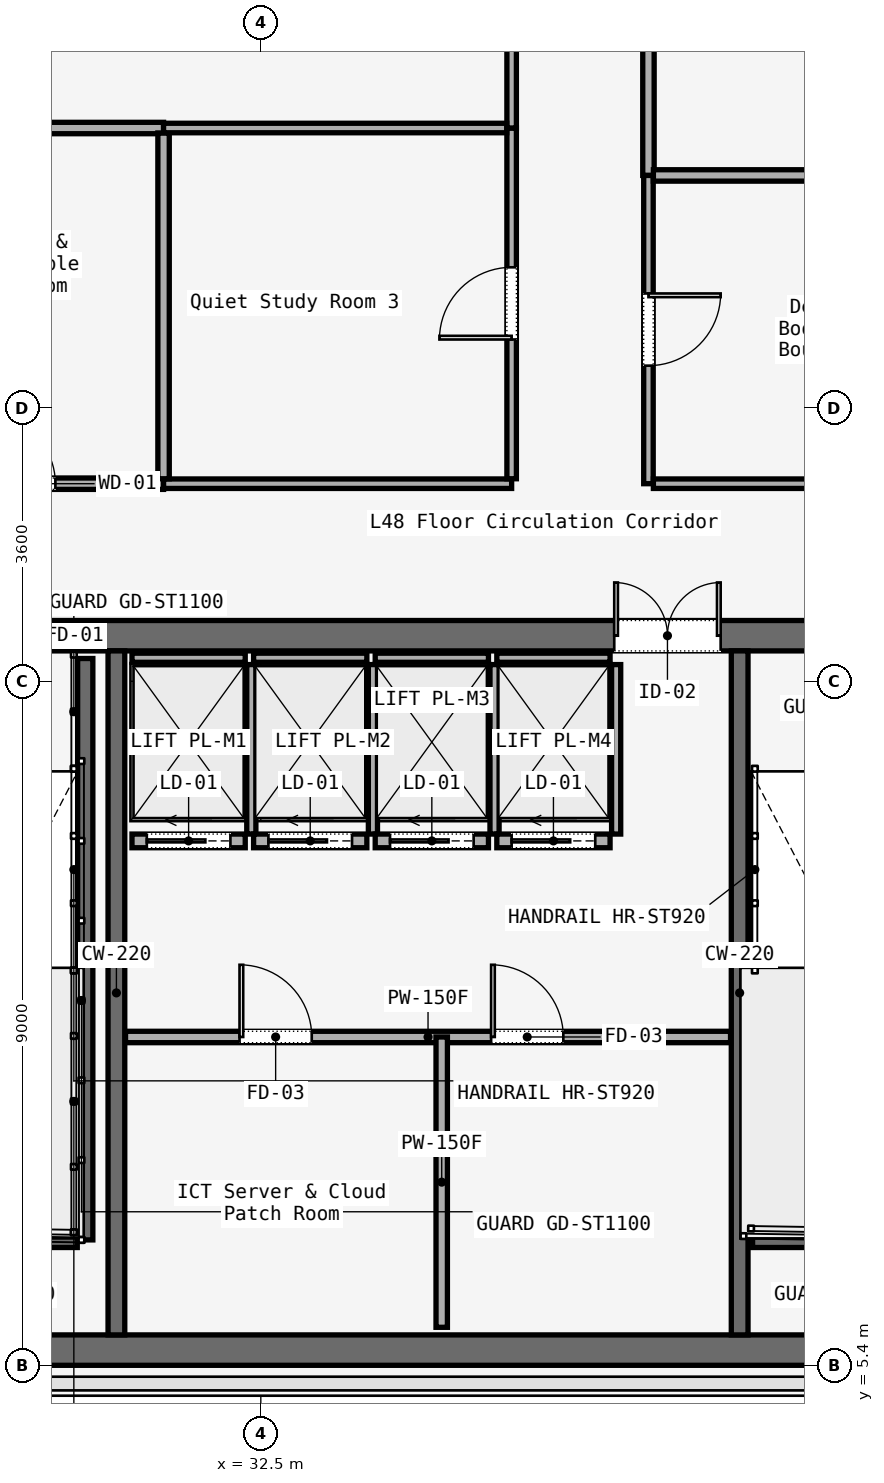
"""IFC4 building model, lengths in metres.
Left out: names, types, materials, properties, quantities, classifications, styles, units other than length and angle.
Written with IfcOpenShell. Run it as: python <this file> out.ifc"""

import sys

from ifc_helpers import new_model, si_unit, direction, frame, frame_2d, origin, place, context, subcontext, project, spatial, rectangle, extrude, element, fill, save


model = new_model("IFC4")
c1 = context("Model", 3, precision=1e-05, world=origin(), true_north=direction((0.0, 1.0)))
c2 = subcontext(c1, "Body", "Model", "MODEL_VIEW")
j1 = project(units=[si_unit("LENGTHUNIT", "METRE"), si_unit("PLANEANGLEUNIT", "RADIAN")], contexts=[c1])
p1 = place(None, origin())
s1 = spatial("IfcSite", under=j1, at=p1, CompositionType="ELEMENT")
p2 = place(p1, origin())
s2 = spatial("IfcBuilding", under=s1, at=p2, CompositionType="ELEMENT")
p3 = place(p2, frame((0.0, 0.0, 199.2)))
s3 = spatial("IfcBuildingStorey", under=s2, at=p3, CompositionType="ELEMENT", Elevation=199.2)
p4 = place(p3, frame((26.45, 15.0, 0.0), z_axis=(0.0, 0.0, 1.0), x_axis=(1.0, 0.0, 0.0)))
e1 = element("IfcWall", 1, at=p4, inside=s3, PredefinedType="SOLIDWALL", context=c2, shape_type="SweptSolid", body=[
    extrude(rectangle(XDim=31.1, YDim=0.4, at=frame_2d((15.55, 0.0))), origin(), (0.0, 0.0, 1.0), 3.52),
])
p5 = place(p4, frame((1.65, 0.0, 0.0)))
e2 = element("IfcOpeningElement", 2, at=p5, cuts=e1, PredefinedType="OPENING", context=c2, shape_type="SweptSolid", body=[
    extrude(rectangle(XDim=1.1, YDim=2.2, at=frame_2d((0.55, 1.1))), frame((0.0, 0.2, 0.0), z_axis=(0.0, -1.0, 0.0), x_axis=(1.0, 0.0, 0.0)), (0.0, 0.0, 1.0), 0.4),
])
p6 = place(p4, frame((13.65, 0.0, 0.0)))
e3 = element("IfcOpeningElement", 3, at=p6, cuts=e1, PredefinedType="OPENING", context=c2, shape_type="SweptSolid", body=[
    extrude(rectangle(XDim=1.1, YDim=2.2, at=frame_2d((0.55, 1.1))), frame((0.0, 0.2, 0.0), z_axis=(0.0, -1.0, 0.0), x_axis=(1.0, 0.0, 0.0)), (0.0, 0.0, 1.0), 0.4),
])
p7 = place(p4, frame((25.55, 0.0, 0.0)))
e4 = element("IfcOpeningElement", 4, at=p7, cuts=e1, PredefinedType="OPENING", context=c2, shape_type="SweptSolid", body=[
    extrude(rectangle(XDim=1.1, YDim=2.2, at=frame_2d((0.55, 1.1))), frame((0.0, 0.2, 0.0), z_axis=(0.0, -1.0, 0.0), x_axis=(1.0, 0.0, 0.0)), (0.0, 0.0, 1.0), 0.4),
])
p8 = place(p4, frame((10.7, 0.0, 0.0)))
e5 = element("IfcOpeningElement", 5, at=p8, cuts=e1, PredefinedType="OPENING", context=c2, shape_type="SweptSolid", body=[
    extrude(rectangle(XDim=1.4, YDim=2.2, at=frame_2d((0.7, 1.1))), frame((0.0, 0.2, 0.0), z_axis=(0.0, -1.0, 0.0), x_axis=(1.0, 0.0, 0.0)), (0.0, 0.0, 1.0), 0.4),
])
p9 = place(p4, frame((19.35, 0.0, 0.0)))
e6 = element("IfcOpeningElement", 6, at=p9, cuts=e1, PredefinedType="OPENING", context=c2, shape_type="SweptSolid", body=[
    extrude(rectangle(XDim=1.1, YDim=2.2, at=frame_2d((0.55, 1.1))), frame((0.0, 0.2, 0.0), z_axis=(0.0, -1.0, 0.0), x_axis=(1.0, 0.0, 0.0)), (0.0, 0.0, 1.0), 0.4),
])
p10 = place(p4, frame((21.4, 0.0, 0.0)))
e7 = element("IfcOpeningElement", 7, at=p10, cuts=e1, PredefinedType="OPENING", context=c2, shape_type="SweptSolid", body=[
    extrude(rectangle(XDim=0.9, YDim=2.1, at=frame_2d((0.45, 1.05))), frame((0.0, 0.2, 0.0), z_axis=(0.0, -1.0, 0.0), x_axis=(1.0, 0.0, 0.0)), (0.0, 0.0, 1.0), 0.4),
])
p11 = place(p4, frame((23.35, 0.0, 0.0)))
e8 = element("IfcOpeningElement", 8, at=p11, cuts=e1, PredefinedType="OPENING", context=c2, shape_type="SweptSolid", body=[
    extrude(rectangle(XDim=1.3, YDim=2.3, at=frame_2d((0.65, 1.15))), frame((0.0, 0.2, 0.0), z_axis=(0.0, -1.0, 0.0), x_axis=(1.0, 0.0, 0.0)), (0.0, 0.0, 1.0), 0.4),
])
p12 = place(p3, frame((26.45, 5.6, 0.0), z_axis=(0.0, 0.0, 1.0), x_axis=(1.0, 0.0, 0.0)))
e9 = element("IfcWall", 9, at=p12, inside=s3, PredefinedType="SOLIDWALL", context=c2, shape_type="SweptSolid", body=[
    extrude(rectangle(XDim=31.1, YDim=0.4, at=frame_2d((15.55, 0.0))), origin(), (0.0, 0.0, 1.0), 3.52),
])
for number, where, z_axis, x_axis in (
    (10, (30.6, 5.8, 0.0), (0.0, 0.0, 1.0), (0.0, 1.0, 0.0)),
    (11, (38.8, 5.8, 0.0), (0.0, 0.0, 1.0), (0.0, 1.0, 0.0)),
):
    element("IfcWall", number, at=place(p3, frame(where, z_axis=z_axis, x_axis=x_axis)), inside=s3, PredefinedType="SOLIDWALL", context=c2, shape_type="SweptSolid", body=[
        extrude(rectangle(XDim=9.0, YDim=0.22, at=frame_2d((4.5, 0.0))), origin(), (0.0, 0.0, 1.0), 3.52),
    ])
p13 = place(p3, frame((30.19, 14.7, 0.0), z_axis=(0.0, 0.0, 1.0), x_axis=(0.0, -1.0, 0.0)))
e12 = element("IfcWall", 12, at=p13, inside=s3, PredefinedType="SOLIDWALL", context=c2, shape_type="SweptSolid", body=[
    extrude(rectangle(XDim=7.65, YDim=0.2, at=frame_2d((3.825, 0.0))), origin(), (0.0, 0.0, 1.0), 3.8),
])
for number, where, z_axis, x_axis in (
    (13, (26.97, 7.05, 0.0), (0.0, 0.0, 1.0), (1.0, 0.0, 0.0)),
    (14, (38.97, 7.05, 0.0), (0.0, 0.0, 1.0), (1.0, 0.0, 0.0)),
):
    element("IfcWall", number, at=place(p3, frame(where, z_axis=z_axis, x_axis=x_axis)), inside=s3, PredefinedType="SOLIDWALL", context=c2, shape_type="SweptSolid", body=[
        extrude(rectangle(XDim=3.115, YDim=0.2, at=frame_2d((1.558, 0.0))), origin(), (0.0, 0.0, 1.0), 3.8),
    ])
p14 = place(p3, frame((30.72, 9.72, 0.0), z_axis=(0.0, 0.0, 1.0), x_axis=(1.0, 0.0, 0.0)))
e15 = element("IfcWall", 15, at=p14, inside=s3, PredefinedType="PARTITIONING", context=c2, shape_type="SweptSolid", body=[
    extrude(rectangle(XDim=7.96, YDim=0.15, at=frame_2d((3.98, 0.0))), origin(), (0.0, 0.0, 1.0), 2.95),
])
p15 = place(p14, frame((1.5, 0.0, 0.0)))
e16 = element("IfcOpeningElement", 16, at=p15, cuts=e15, PredefinedType="OPENING", context=c2, shape_type="SweptSolid", body=[
    extrude(rectangle(XDim=0.95, YDim=2.2, at=frame_2d((0.475, 1.1))), frame((0.0, 0.075, 0.0), z_axis=(0.0, -1.0, 0.0), x_axis=(1.0, 0.0, 0.0)), (0.0, 0.0, 1.0), 0.15),
])
p16 = place(p14, frame((4.81, 0.0, 0.0)))
e17 = element("IfcOpeningElement", 17, at=p16, cuts=e15, PredefinedType="OPENING", context=c2, shape_type="SweptSolid", body=[
    extrude(rectangle(XDim=0.95, YDim=2.2, at=frame_2d((0.475, 1.1))), frame((0.0, 0.075, 0.0), z_axis=(0.0, -1.0, 0.0), x_axis=(1.0, 0.0, 0.0)), (0.0, 0.0, 1.0), 0.15),
])
p17 = place(p3, frame((34.88, 5.9, 0.0), z_axis=(0.0, 0.0, 1.0), x_axis=(0.0, 1.0, 0.0)))
e18 = element("IfcWall", 18, at=p17, inside=s3, PredefinedType="PARTITIONING", context=c2, shape_type="SweptSolid", body=[
    extrude(rectangle(XDim=3.82, YDim=0.15, at=frame_2d((1.91, 0.0))), origin(), (0.0, 0.0, 1.0), 2.95),
])
p18 = place(p3, frame((30.805, 12.3, 0.0), z_axis=(0.0, 0.0, 1.0), x_axis=(1.0, 0.0, 0.0)))
e19 = element("IfcWall", 19, at=p18, inside=s3, PredefinedType="SOLIDWALL", context=c2, shape_type="SweptSolid", body=[
    extrude(rectangle(XDim=1.49, YDim=0.18, at=frame_2d((0.745, 0.0))), origin(), (0.0, 0.0, 1.0), 2.95),
])
p19 = place(p18, frame((0.195, 0.0, 0.0)))
e20 = element("IfcOpeningElement", 20, at=p19, cuts=e19, PredefinedType="OPENING", context=c2, shape_type="SweptSolid", body=[
    extrude(rectangle(XDim=1.1, YDim=2.2, at=frame_2d((0.55, 1.1))), frame((0.0, 0.09, 0.0), z_axis=(0.0, -1.0, 0.0), x_axis=(1.0, 0.0, 0.0)), (0.0, 0.0, 1.0), 0.18),
])
p20 = place(p3, frame((30.805, 14.71, 0.0), z_axis=(0.0, 0.0, 1.0), x_axis=(1.0, 0.0, 0.0)))
e21 = element("IfcWall", 21, at=p20, inside=s3, PredefinedType="SOLIDWALL", context=c2, shape_type="SweptSolid", body=[
    extrude(rectangle(XDim=1.49, YDim=0.12, at=frame_2d((0.745, 0.0))), origin(), (0.0, 0.0, 1.0), 2.95),
])
p21 = place(p3, frame((32.375, 12.39, 0.0), z_axis=(0.0, 0.0, 1.0), x_axis=(0.0, 1.0, 0.0)))
e22 = element("IfcWall", 22, at=p21, inside=s3, PredefinedType="SOLIDWALL", context=c2, shape_type="SweptSolid", body=[
    extrude(rectangle(XDim=2.23, YDim=0.12, at=frame_2d((1.115, 0.0))), origin(), (0.0, 0.0, 1.0), 2.95),
])
p22 = place(p3, frame((32.405, 12.3, 0.0), z_axis=(0.0, 0.0, 1.0), x_axis=(1.0, 0.0, 0.0)))
e23 = element("IfcWall", 23, at=p22, inside=s3, PredefinedType="SOLIDWALL", context=c2, shape_type="SweptSolid", body=[
    extrude(rectangle(XDim=1.49, YDim=0.18, at=frame_2d((0.745, 0.0))), origin(), (0.0, 0.0, 1.0), 2.95),
])
p23 = place(p22, frame((0.195, 0.0, 0.0)))
e24 = element("IfcOpeningElement", 24, at=p23, cuts=e23, PredefinedType="OPENING", context=c2, shape_type="SweptSolid", body=[
    extrude(rectangle(XDim=1.1, YDim=2.2, at=frame_2d((0.55, 1.1))), frame((0.0, 0.09, 0.0), z_axis=(0.0, -1.0, 0.0), x_axis=(1.0, 0.0, 0.0)), (0.0, 0.0, 1.0), 0.18),
])
p24 = place(p3, frame((32.405, 14.71, 0.0), z_axis=(0.0, 0.0, 1.0), x_axis=(1.0, 0.0, 0.0)))
e25 = element("IfcWall", 25, at=p24, inside=s3, PredefinedType="SOLIDWALL", context=c2, shape_type="SweptSolid", body=[
    extrude(rectangle(XDim=1.49, YDim=0.12, at=frame_2d((0.745, 0.0))), origin(), (0.0, 0.0, 1.0), 2.95),
])
p25 = place(p3, frame((33.975, 12.39, 0.0), z_axis=(0.0, 0.0, 1.0), x_axis=(0.0, 1.0, 0.0)))
e26 = element("IfcWall", 26, at=p25, inside=s3, PredefinedType="SOLIDWALL", context=c2, shape_type="SweptSolid", body=[
    extrude(rectangle(XDim=2.23, YDim=0.12, at=frame_2d((1.115, 0.0))), origin(), (0.0, 0.0, 1.0), 2.95),
])
p26 = place(p3, frame((34.005, 12.3, 0.0), z_axis=(0.0, 0.0, 1.0), x_axis=(1.0, 0.0, 0.0)))
e27 = element("IfcWall", 27, at=p26, inside=s3, PredefinedType="SOLIDWALL", context=c2, shape_type="SweptSolid", body=[
    extrude(rectangle(XDim=1.49, YDim=0.18, at=frame_2d((0.745, 0.0))), origin(), (0.0, 0.0, 1.0), 2.95),
])
p27 = place(p26, frame((0.195, 0.0, 0.0)))
e28 = element("IfcOpeningElement", 28, at=p27, cuts=e27, PredefinedType="OPENING", context=c2, shape_type="SweptSolid", body=[
    extrude(rectangle(XDim=1.1, YDim=2.2, at=frame_2d((0.55, 1.1))), frame((0.0, 0.09, 0.0), z_axis=(0.0, -1.0, 0.0), x_axis=(1.0, 0.0, 0.0)), (0.0, 0.0, 1.0), 0.18),
])
p28 = place(p3, frame((34.005, 14.71, 0.0), z_axis=(0.0, 0.0, 1.0), x_axis=(1.0, 0.0, 0.0)))
e29 = element("IfcWall", 29, at=p28, inside=s3, PredefinedType="SOLIDWALL", context=c2, shape_type="SweptSolid", body=[
    extrude(rectangle(XDim=1.49, YDim=0.12, at=frame_2d((0.745, 0.0))), origin(), (0.0, 0.0, 1.0), 2.95),
])
p29 = place(p3, frame((35.575, 12.39, 0.0), z_axis=(0.0, 0.0, 1.0), x_axis=(0.0, 1.0, 0.0)))
e30 = element("IfcWall", 30, at=p29, inside=s3, PredefinedType="SOLIDWALL", context=c2, shape_type="SweptSolid", body=[
    extrude(rectangle(XDim=2.23, YDim=0.12, at=frame_2d((1.115, 0.0))), origin(), (0.0, 0.0, 1.0), 2.95),
])
p30 = place(p3, frame((35.605, 12.3, 0.0), z_axis=(0.0, 0.0, 1.0), x_axis=(1.0, 0.0, 0.0)))
e31 = element("IfcWall", 31, at=p30, inside=s3, PredefinedType="SOLIDWALL", context=c2, shape_type="SweptSolid", body=[
    extrude(rectangle(XDim=1.49, YDim=0.18, at=frame_2d((0.745, 0.0))), origin(), (0.0, 0.0, 1.0), 2.95),
])
p31 = place(p30, frame((0.195, 0.0, 0.0)))
e32 = element("IfcOpeningElement", 32, at=p31, cuts=e31, PredefinedType="OPENING", context=c2, shape_type="SweptSolid", body=[
    extrude(rectangle(XDim=1.1, YDim=2.2, at=frame_2d((0.55, 1.1))), frame((0.0, 0.09, 0.0), z_axis=(0.0, -1.0, 0.0), x_axis=(1.0, 0.0, 0.0)), (0.0, 0.0, 1.0), 0.18),
])
p32 = place(p3, frame((35.605, 14.71, 0.0), z_axis=(0.0, 0.0, 1.0), x_axis=(1.0, 0.0, 0.0)))
e33 = element("IfcWall", 33, at=p32, inside=s3, PredefinedType="SOLIDWALL", context=c2, shape_type="SweptSolid", body=[
    extrude(rectangle(XDim=1.49, YDim=0.12, at=frame_2d((0.745, 0.0))), origin(), (0.0, 0.0, 1.0), 2.95),
])
p33 = place(p3, frame((37.175, 12.39, 0.0), z_axis=(0.0, 0.0, 1.0), x_axis=(0.0, 1.0, 0.0)))
e34 = element("IfcWall", 34, at=p33, inside=s3, PredefinedType="SOLIDWALL", context=c2, shape_type="SweptSolid", body=[
    extrude(rectangle(XDim=2.23, YDim=0.12, at=frame_2d((1.115, 0.0))), origin(), (0.0, 0.0, 1.0), 2.95),
])
p34 = place(p3, frame((27.474, 17.0, 0.0), z_axis=(0.0, 0.0, 1.0), x_axis=(1.0, 0.0, 0.0)))
e35 = element("IfcWall", 35, at=p34, inside=s3, PredefinedType="PARTITIONING", context=c2, shape_type="SweptSolid", body=[
    extrude(rectangle(XDim=3.747, YDim=0.15, at=frame_2d((1.874, 0.0))), origin(), (0.0, 0.0, 1.0), 2.95),
])
p35 = place(p34, frame((1.424, 0.0, 0.0)))
e36 = element("IfcOpeningElement", 36, at=p35, cuts=e35, PredefinedType="OPENING", context=c2, shape_type="SweptSolid", body=[
    extrude(rectangle(XDim=0.9, YDim=2.15, at=frame_2d((0.45, 1.075))), frame((0.0, 0.075, 0.0), z_axis=(0.0, -1.0, 0.0), x_axis=(1.0, 0.0, 0.0)), (0.0, 0.0, 1.0), 0.15),
])
p36 = place(p3, frame((31.22, 17.0, 0.0), z_axis=(0.0, 0.0, 1.0), x_axis=(1.0, 0.0, 0.0)))
e37 = element("IfcWall", 37, at=p36, inside=s3, PredefinedType="PARTITIONING", context=c2, shape_type="SweptSolid", body=[
    extrude(rectangle(XDim=4.58, YDim=0.125, at=frame_2d((2.29, 0.0))), origin(), (0.0, 0.0, 1.0), 2.95),
])
p37 = place(p3, frame((35.8, 17.065, 0.0), z_axis=(0.0, 0.0, 1.0), x_axis=(0.0, 1.0, 0.0)))
e38 = element("IfcWall", 38, at=p37, inside=s3, PredefinedType="PARTITIONING", context=c2, shape_type="SweptSolid", body=[
    extrude(rectangle(XDim=4.615, YDim=0.125, at=frame_2d((2.308, 0.0))), origin(), (0.0, 0.0, 1.0), 2.95),
])
p38 = place(p37, frame((1.833, 0.0, 0.0)))
e39 = element("IfcOpeningElement", 39, at=p38, cuts=e38, PredefinedType="OPENING", context=c2, shape_type="SweptSolid", body=[
    extrude(rectangle(XDim=0.95, YDim=2.2, at=frame_2d((0.475, 1.1))), frame((0.0, 0.062, 0.0), z_axis=(0.0, -1.0, 0.0), x_axis=(1.0, 0.0, 0.0)), (0.0, 0.0, 1.0), 0.125),
])
p39 = place(p3, frame((35.8, 21.68, 0.0), z_axis=(0.0, 0.0, 1.0), x_axis=(0.0, 1.0, 0.0)))
e40 = element("IfcWall", 40, at=p39, inside=s3, PredefinedType="PARTITIONING", context=c2, shape_type="SweptSolid", body=[
    extrude(rectangle(XDim=2.403, YDim=0.125, at=frame_2d((1.201, 0.0))), origin(), (0.0, 0.0, 1.0), 2.95),
])
p40 = place(p3, frame((37.6, 27.335, 0.0), z_axis=(0.0, 0.0, 1.0), x_axis=(0.0, -1.0, 0.0)))
e41 = element("IfcWall", 41, at=p40, inside=s3, PredefinedType="PARTITIONING", context=c2, shape_type="SweptSolid", body=[
    extrude(rectangle(XDim=6.279, YDim=0.15, at=frame_2d((3.14, 0.0))), origin(), (0.0, 0.0, 1.0), 2.95),
])
p41 = place(p40, frame((2.665, 0.0, 0.0)))
e42 = element("IfcOpeningElement", 42, at=p41, cuts=e41, PredefinedType="OPENING", context=c2, shape_type="SweptSolid", body=[
    extrude(rectangle(XDim=0.95, YDim=2.2, at=frame_2d((0.475, 1.1))), frame((0.0, 0.075, 0.0), z_axis=(0.0, -1.0, 0.0), x_axis=(1.0, 0.0, 0.0)), (0.0, 0.0, 1.0), 0.15),
])
p42 = place(p3, frame((37.6, 21.056, 0.0), z_axis=(0.0, 0.0, 1.0), x_axis=(0.0, -1.0, 0.0)))
e43 = element("IfcWall", 43, at=p42, inside=s3, PredefinedType="PARTITIONING", context=c2, shape_type="SweptSolid", body=[
    extrude(rectangle(XDim=4.056, YDim=0.125, at=frame_2d((2.028, 0.0))), origin(), (0.0, 0.0, 1.0), 2.95),
])
p43 = place(p42, frame((1.553, 0.0, 0.0)))
e44 = element("IfcOpeningElement", 44, at=p43, cuts=e43, PredefinedType="OPENING", context=c2, shape_type="SweptSolid", body=[
    extrude(rectangle(XDim=0.95, YDim=2.2, at=frame_2d((0.475, 1.1))), frame((0.0, 0.062, 0.0), z_axis=(0.0, -1.0, 0.0), x_axis=(1.0, 0.0, 0.0)), (0.0, 0.0, 1.0), 0.125),
])
p44 = place(p3, frame((37.665, 17.0, 0.0), z_axis=(0.0, 0.0, 1.0), x_axis=(1.0, 0.0, 0.0)))
e45 = element("IfcWall", 45, at=p44, inside=s3, PredefinedType="PARTITIONING", context=c2, shape_type="SweptSolid", body=[
    extrude(rectangle(XDim=3.445, YDim=0.125, at=frame_2d((1.723, 0.0))), origin(), (0.0, 0.0, 1.0), 2.95),
])
p45 = place(p3, frame((37.665, 21.056, 0.0), z_axis=(0.0, 0.0, 1.0), x_axis=(1.0, 0.0, 0.0)))
e46 = element("IfcWall", 46, at=p45, inside=s3, PredefinedType="PARTITIONING", context=c2, shape_type="SweptSolid", body=[
    extrude(rectangle(XDim=3.38, YDim=0.15, at=frame_2d((1.69, 0.0))), origin(), (0.0, 0.0, 1.0), 2.95),
])
p46 = place(p3, frame((27.539, 21.68, 0.0), z_axis=(0.0, 0.0, 1.0), x_axis=(1.0, 0.0, 0.0)))
e47 = element("IfcWall", 47, at=p46, inside=s3, PredefinedType="PARTITIONING", context=c2, shape_type="SweptSolid", body=[
    extrude(rectangle(XDim=3.682, YDim=0.15, at=frame_2d((1.841, 0.0))), origin(), (0.0, 0.0, 1.0), 2.95),
])
p47 = place(p3, frame((31.22, 21.615, 0.0), z_axis=(0.0, 0.0, 1.0), x_axis=(0.0, -1.0, 0.0)))
e48 = element("IfcWall", 48, at=p47, inside=s3, PredefinedType="PARTITIONING", context=c2, shape_type="SweptSolid", body=[
    extrude(rectangle(XDim=4.55, YDim=0.15, at=frame_2d((2.275, 0.0))), origin(), (0.0, 0.0, 1.0), 2.95),
])
p48 = place(p3, frame((31.22, 21.68, 0.0), z_axis=(0.0, 0.0, 1.0), x_axis=(1.0, 0.0, 0.0)))
e49 = element("IfcWall", 49, at=p48, inside=s3, PredefinedType="PARTITIONING", context=c2, shape_type="SweptSolid", body=[
    extrude(rectangle(XDim=4.515, YDim=0.125, at=frame_2d((2.257, 0.0))), origin(), (0.0, 0.0, 1.0), 2.95),
])
p49 = place(p8, origin())
e50 = element("IfcDoor", 50, at=p49, inside=s3, OperationType="DOUBLE_DOOR_SINGLE_SWING", PredefinedType="DOOR", context=c2, shape_type="SweptSolid", body=[
    extrude(rectangle(XDim=1.4, YDim=2.2, at=frame_2d((0.7, 1.1))), frame((0.0, 0.025, 0.0), z_axis=(0.0, -1.0, 0.0), x_axis=(1.0, 0.0, 0.0)), (0.0, 0.0, 1.0), 0.05),
])
fill(e5, e50)
p50 = place(p15, origin())
e51 = element("IfcDoor", 51, at=p50, inside=s3, OperationType="SINGLE_SWING_LEFT", PredefinedType="DOOR", context=c2, shape_type="SweptSolid", body=[
    extrude(rectangle(XDim=0.95, YDim=2.2, at=frame_2d((0.475, 1.1))), frame((0.0, 0.025, 0.0), z_axis=(0.0, -1.0, 0.0), x_axis=(1.0, 0.0, 0.0)), (0.0, 0.0, 1.0), 0.05),
])
fill(e16, e51)
p51 = place(p16, origin())
e52 = element("IfcDoor", 52, at=p51, inside=s3, OperationType="SINGLE_SWING_RIGHT", PredefinedType="DOOR", context=c2, shape_type="SweptSolid", body=[
    extrude(rectangle(XDim=0.95, YDim=2.2, at=frame_2d((0.475, 1.1))), frame((0.0, 0.025, 0.0), z_axis=(0.0, -1.0, 0.0), x_axis=(1.0, 0.0, 0.0)), (0.0, 0.0, 1.0), 0.05),
])
fill(e17, e52)
p52 = place(p19, origin())
e53 = element("IfcDoor", 53, at=p52, inside=s3, OperationType="SLIDING_TO_LEFT", PredefinedType="DOOR", context=c2, shape_type="SweptSolid", body=[
    extrude(rectangle(XDim=1.1, YDim=2.2, at=frame_2d((0.55, 1.1))), frame((0.0, 0.025, 0.0), z_axis=(0.0, -1.0, 0.0), x_axis=(1.0, 0.0, 0.0)), (0.0, 0.0, 1.0), 0.05),
])
fill(e20, e53)
p53 = place(p23, origin())
e54 = element("IfcDoor", 54, at=p53, inside=s3, OperationType="SLIDING_TO_LEFT", PredefinedType="DOOR", context=c2, shape_type="SweptSolid", body=[
    extrude(rectangle(XDim=1.1, YDim=2.2, at=frame_2d((0.55, 1.1))), frame((0.0, 0.025, 0.0), z_axis=(0.0, -1.0, 0.0), x_axis=(1.0, 0.0, 0.0)), (0.0, 0.0, 1.0), 0.05),
])
fill(e24, e54)
p54 = place(p27, origin())
e55 = element("IfcDoor", 55, at=p54, inside=s3, OperationType="SLIDING_TO_LEFT", PredefinedType="DOOR", context=c2, shape_type="SweptSolid", body=[
    extrude(rectangle(XDim=1.1, YDim=2.2, at=frame_2d((0.55, 1.1))), frame((0.0, 0.025, 0.0), z_axis=(0.0, -1.0, 0.0), x_axis=(1.0, 0.0, 0.0)), (0.0, 0.0, 1.0), 0.05),
])
fill(e28, e55)
p55 = place(p31, origin())
e56 = element("IfcDoor", 56, at=p55, inside=s3, OperationType="SLIDING_TO_LEFT", PredefinedType="DOOR", context=c2, shape_type="SweptSolid", body=[
    extrude(rectangle(XDim=1.1, YDim=2.2, at=frame_2d((0.55, 1.1))), frame((0.0, 0.025, 0.0), z_axis=(0.0, -1.0, 0.0), x_axis=(1.0, 0.0, 0.0)), (0.0, 0.0, 1.0), 0.05),
])
fill(e32, e56)
p56 = place(p43, origin())
e57 = element("IfcDoor", 57, at=p56, inside=s3, OperationType="SINGLE_SWING_LEFT", PredefinedType="DOOR", context=c2, shape_type="SweptSolid", body=[
    extrude(rectangle(XDim=0.95, YDim=2.2, at=frame_2d((0.475, 1.1))), frame((0.0, 0.025, 0.0), z_axis=(0.0, -1.0, 0.0), x_axis=(1.0, 0.0, 0.0)), (0.0, 0.0, 1.0), 0.05),
])
fill(e44, e57)
p57 = place(p35, origin())
e58 = element("IfcDoor", 58, at=p57, inside=s3, OperationType="SINGLE_SWING_LEFT", PredefinedType="DOOR", context=c2, shape_type="SweptSolid", body=[
    extrude(rectangle(XDim=0.9, YDim=2.15, at=frame_2d((0.45, 1.075))), frame((0.0, 0.025, 0.0), z_axis=(0.0, -1.0, 0.0), x_axis=(1.0, 0.0, 0.0)), (0.0, 0.0, 1.0), 0.05),
])
fill(e36, e58)
p58 = place(p38, origin())
e59 = element("IfcDoor", 59, at=p58, inside=s3, OperationType="SINGLE_SWING_RIGHT", PredefinedType="DOOR", context=c2, shape_type="SweptSolid", body=[
    extrude(rectangle(XDim=0.95, YDim=2.2, at=frame_2d((0.475, 1.1))), frame((0.0, 0.025, 0.0), z_axis=(0.0, -1.0, 0.0), x_axis=(1.0, 0.0, 0.0)), (0.0, 0.0, 1.0), 0.05),
])
fill(e39, e59)
save(model, sys.argv[1])
